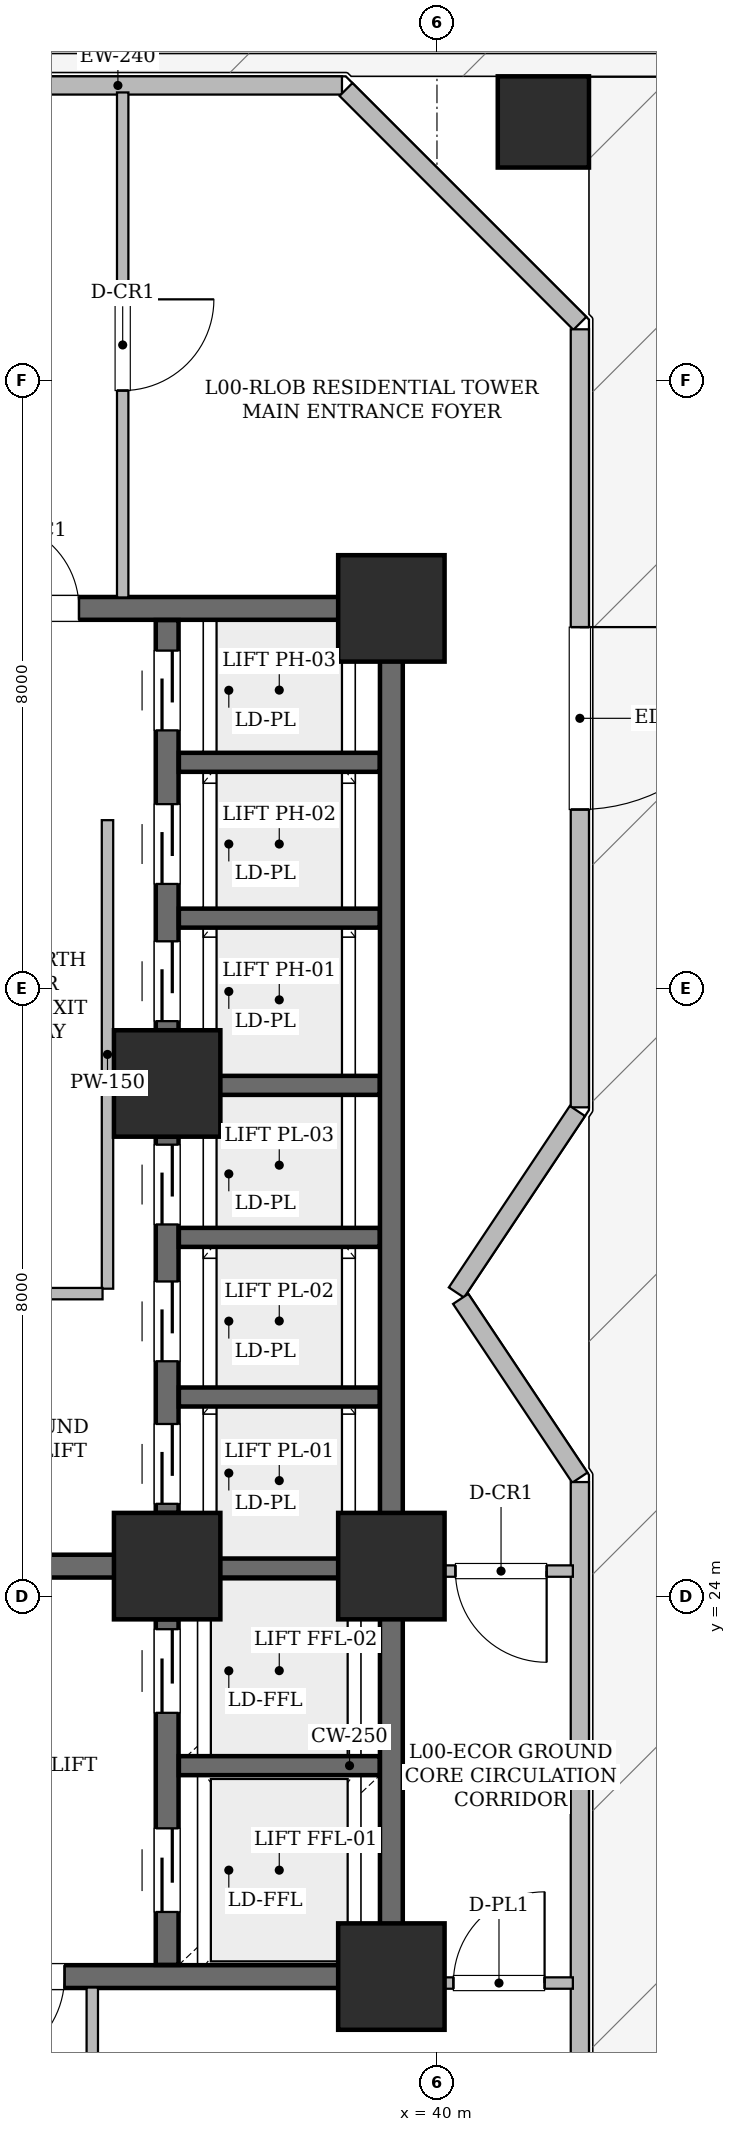
"""IFC4 building model, lengths in metres.
Left out: names, types, materials, properties, quantities, classifications, styles, units other than length and angle.
Written with IfcOpenShell. Run it as: python <this file> out.ifc"""

import sys

from ifc_helpers import new_model, si_unit, direction, frame, frame_2d, origin, origin_2d, place, context, subcontext, project, spatial, rectangle, hollow_rectangle, extrude, element, fill, save


model = new_model("IFC4")
c1 = context("Model", 3, precision=1e-05, world=origin(), true_north=direction((0.0, 1.0)))
c2 = subcontext(c1, "Body", "Model", "MODEL_VIEW")
j1 = project(units=[si_unit("LENGTHUNIT", "METRE"), si_unit("PLANEANGLEUNIT", "RADIAN")], contexts=[c1])
p1 = place(None, origin())
s1 = spatial("IfcSite", under=j1, at=p1, CompositionType="ELEMENT")
p2 = place(p1, origin())
s2 = spatial("IfcBuilding", under=s1, at=p2, CompositionType="ELEMENT")
p3 = place(p2, origin())
s3 = spatial("IfcBuildingStorey", under=s2, at=p3, CompositionType="ELEMENT", Elevation=0.0)
for number, where, z_axis, x_axis in (
    (1, (39.4, 19.0, 0.0), (0.0, 0.0, 1.0), (1.0, 0.0, 0.0)),
    (2, (36.45, 24.4, 0.0), (0.0, 0.0, 1.0), (1.0, 0.0, 0.0)),
    (3, (39.4, 24.4, 0.0), (0.0, 0.0, 1.0), (1.0, 0.0, 0.0)),
    (4, (36.45, 30.75, 0.0), (0.0, 0.0, 1.0), (1.0, 0.0, 0.0)),
    (5, (39.4, 37.0, 0.0), (0.0, 0.0, 1.0), (1.0, 0.0, 0.0)),
):
    element("IfcColumn", number, at=place(p3, frame(where, z_axis=z_axis, x_axis=x_axis)), inside=s3, PredefinedType="COLUMN", context=c2, shape_type="SweptSolid", body=[
        extrude(hollow_rectangle(XDim=1.4, YDim=1.4, WallThickness=0.07, at=origin_2d()), origin(), (0.0, 0.0, 1.0), 7.2),
    ])
p4 = place(p3, frame((41.4, 43.4, 0.0), z_axis=(0.0, 0.0, 1.0), x_axis=(1.0, 0.0, 0.0)))
e6 = element("IfcColumn", 6, at=p4, inside=s3, PredefinedType="COLUMN", context=c2, shape_type="SweptSolid", body=[
    extrude(hollow_rectangle(XDim=1.2, YDim=1.2, WallThickness=0.06, at=origin_2d()), origin(), (0.0, 0.0, 1.0), 7.2),
])
p5 = place(p3, frame((19.097, 43.88, 0.0), z_axis=(0.0, 0.0, 1.0), x_axis=(1.0, 0.0, 0.0)))
e7 = element("IfcWall", 7, at=p5, inside=s3, PredefinedType="STANDARD", context=c2, shape_type="SweptSolid", body=[
    extrude(rectangle(XDim=19.653, YDim=0.24, at=frame_2d((9.827, 0.0))), origin(), (0.0, 0.0, 1.0), 6.78),
])
p6 = place(p5, frame((11.653, 0.0, 0.0)))
e8 = element("IfcOpeningElement", 8, at=p6, cuts=e7, PredefinedType="OPENING", context=c2, shape_type="SweptSolid", body=[
    extrude(rectangle(XDim=1.8, YDim=2.2, at=frame_2d((0.9, 1.1))), frame((0.0, 0.13, 0.0), z_axis=(0.0, -1.0, 0.0), x_axis=(1.0, 0.0, 0.0)), (0.0, 0.0, 1.0), 0.26),
])
p7 = place(p5, frame((2.0, 0.0, 0.0)))
e9 = element("IfcOpeningElement", 9, at=p7, cuts=e7, PredefinedType="OPENING", context=c2, shape_type="SweptSolid", body=[
    extrude(rectangle(XDim=2.4, YDim=2.4, at=frame_2d((1.2, 1.2))), frame((0.0, 0.13, 0.0), z_axis=(0.0, -1.0, 0.0), x_axis=(1.0, 0.0, 0.0)), (0.0, 0.0, 1.0), 0.26),
])
p8 = place(p3, frame((38.803, 43.827, 0.0), z_axis=(0.0, 0.0, 1.0), x_axis=(0.707106781187, -0.707106781187, 0.0)))
e10 = element("IfcWall", 10, at=p8, inside=s3, PredefinedType="STANDARD", context=c2, shape_type="SweptSolid", body=[
    extrude(rectangle(XDim=4.351, YDim=0.24, at=frame_2d((2.176, 0.0))), origin(), (0.0, 0.0, 1.0), 6.78),
])
p9 = place(p3, frame((41.88, 40.672, 0.0), z_axis=(0.0, 0.0, 1.0), x_axis=(0.0, -1.0, 0.0)))
e11 = element("IfcWall", 11, at=p9, inside=s3, PredefinedType="STANDARD", context=c2, shape_type="SweptSolid", body=[
    extrude(rectangle(XDim=10.236, YDim=0.24, at=frame_2d((5.118, 0.0))), origin(), (0.0, 0.0, 1.0), 6.78),
])
p10 = place(p9, frame((3.918, 0.0, 0.0)))
e12 = element("IfcOpeningElement", 12, at=p10, cuts=e11, PredefinedType="OPENING", context=c2, shape_type="SweptSolid", body=[
    extrude(rectangle(XDim=2.4, YDim=2.4, at=frame_2d((1.2, 1.2))), frame((0.0, 0.13, 0.0), z_axis=(0.0, -1.0, 0.0), x_axis=(1.0, 0.0, 0.0)), (0.0, 0.0, 1.0), 0.26),
])
p11 = place(p3, frame((41.848, 30.388, 0.0), z_axis=(0.0, 0.0, 1.0), x_axis=(-0.55466093221, -0.83207646901, 0.0)))
e13 = element("IfcWall", 13, at=p11, inside=s3, PredefinedType="STANDARD", context=c2, shape_type="SweptSolid", body=[
    extrude(rectangle(XDim=2.87, YDim=0.24, at=frame_2d((1.435, 0.0))), origin(), (0.0, 0.0, 1.0), 6.78),
])
p12 = place(p3, frame((40.312, 27.916, 0.0), z_axis=(0.0, 0.0, 1.0), x_axis=(0.554660333073, -0.832076868394, 0.0)))
e14 = element("IfcWall", 14, at=p12, inside=s3, PredefinedType="STANDARD", context=c2, shape_type="SweptSolid", body=[
    extrude(rectangle(XDim=2.827, YDim=0.24, at=frame_2d((1.413, 0.0))), origin(), (0.0, 0.0, 1.0), 6.78),
])
p13 = place(p3, frame((41.88, 25.506, 0.0), z_axis=(0.0, 0.0, 1.0), x_axis=(0.0, -1.0, 0.0)))
e15 = element("IfcWall", 15, at=p13, inside=s3, PredefinedType="STANDARD", context=c2, shape_type="SweptSolid", body=[
    extrude(rectangle(XDim=10.256, YDim=0.24, at=frame_2d((5.128, 0.0))), origin(), (0.0, 0.0, 1.0), 6.78),
])
p14 = place(p3, frame((39.4, 19.0, 0.0), z_axis=(0.0, 0.0, 1.0), x_axis=(-1.0, 0.0, 0.0)))
e16 = element("IfcWall", 16, at=p14, inside=s3, PredefinedType="SHEAR", context=c2, shape_type="SweptSolid", body=[
    extrude(rectangle(XDim=10.4, YDim=0.3, at=frame_2d((5.2, 0.0))), origin(), (0.0, 0.0, 1.0), 6.78),
])
p15 = place(p14, frame((4.3, 0.0, 0.0)))
e17 = element("IfcOpeningElement", 17, at=p15, cuts=e16, PredefinedType="OPENING", context=c2, shape_type="SweptSolid", body=[
    extrude(rectangle(XDim=1.2, YDim=2.15, at=frame_2d((0.6, 1.075))), frame((0.0, 0.16, 0.0), z_axis=(0.0, -1.0, 0.0), x_axis=(1.0, 0.0, 0.0)), (0.0, 0.0, 1.0), 0.32),
])
p16 = place(p3, frame((29.0, 37.0, 0.0), z_axis=(0.0, 0.0, 1.0), x_axis=(1.0, 0.0, 0.0)))
e18 = element("IfcWall", 18, at=p16, inside=s3, PredefinedType="SHEAR", context=c2, shape_type="SweptSolid", body=[
    extrude(rectangle(XDim=10.4, YDim=0.3, at=frame_2d((5.2, 0.0))), origin(), (0.0, 0.0, 1.0), 6.78),
])
p17 = place(p16, frame((5.14, 0.0, 0.0)))
e19 = element("IfcOpeningElement", 19, at=p17, cuts=e18, PredefinedType="OPENING", context=c2, shape_type="SweptSolid", body=[
    extrude(rectangle(XDim=1.15, YDim=2.2, at=frame_2d((0.575, 1.1))), frame((0.0, 0.16, 0.0), z_axis=(0.0, -1.0, 0.0), x_axis=(1.0, 0.0, 0.0)), (0.0, 0.0, 1.0), 0.32),
])
p18 = place(p3, frame((39.4, 19.0, 0.0), z_axis=(0.0, 0.0, 1.0), x_axis=(0.0, 1.0, 0.0)))
e20 = element("IfcWall", 20, at=p18, inside=s3, PredefinedType="SHEAR", context=c2, shape_type="SweptSolid", body=[
    extrude(rectangle(XDim=5.4, YDim=0.3, at=frame_2d((2.7, 0.0))), origin(), (0.0, 0.0, 1.0), 6.78),
])
p19 = place(p3, frame((39.4, 24.4, 0.0), z_axis=(0.0, 0.0, 1.0), x_axis=(0.0, 1.0, 0.0)))
e21 = element("IfcWall", 21, at=p19, inside=s3, PredefinedType="SHEAR", context=c2, shape_type="SweptSolid", body=[
    extrude(rectangle(XDim=12.6, YDim=0.3, at=frame_2d((6.3, 0.0))), origin(), (0.0, 0.0, 1.0), 6.78),
])
p20 = place(p3, frame((32.65, 24.4, 0.0), z_axis=(0.0, 0.0, 1.0), x_axis=(1.0, 0.0, 0.0)))
e22 = element("IfcWall", 22, at=p20, inside=s3, PredefinedType="SHEAR", context=c2, shape_type="SweptSolid", body=[
    extrude(rectangle(XDim=3.8, YDim=0.3, at=frame_2d((1.9, 0.0))), origin(), (0.0, 0.0, 1.0), 6.78),
])
p21 = place(p3, frame((36.45, 19.154, 0.0), z_axis=(0.0, 0.0, 1.0), x_axis=(0.0, 1.0, 0.0)))
e23 = element("IfcWall", 23, at=p21, inside=s3, PredefinedType="SHEAR", context=c2, shape_type="SweptSolid", body=[
    extrude(rectangle(XDim=4.546, YDim=0.3, at=frame_2d((2.273, 0.0))), origin(), (0.0, 0.0, 1.0), 6.78),
])
p22 = place(p21, frame((0.696, 0.0, 0.0)))
e24 = element("IfcOpeningElement", 24, at=p22, cuts=e23, PredefinedType="OPENING", context=c2, shape_type="SweptSolid", body=[
    extrude(rectangle(XDim=1.1, YDim=2.15, at=frame_2d((0.55, 1.075))), frame((0.0, 0.16, 0.0), z_axis=(0.0, -1.0, 0.0), x_axis=(1.0, 0.0, 0.0)), (0.0, 0.0, 1.0), 0.32),
])
p23 = place(p21, frame((3.316, 0.0, 0.0)))
e25 = element("IfcOpeningElement", 25, at=p23, cuts=e23, PredefinedType="OPENING", context=c2, shape_type="SweptSolid", body=[
    extrude(rectangle(XDim=1.1, YDim=2.15, at=frame_2d((0.55, 1.075))), frame((0.0, 0.16, 0.0), z_axis=(0.0, -1.0, 0.0), x_axis=(1.0, 0.0, 0.0)), (0.0, 0.0, 1.0), 0.32),
])
p24 = place(p3, frame((36.45, 25.1, 0.0), z_axis=(0.0, 0.0, 1.0), x_axis=(0.0, 1.0, 0.0)))
e26 = element("IfcWall", 26, at=p24, inside=s3, PredefinedType="SHEAR", context=c2, shape_type="SweptSolid", body=[
    extrude(rectangle(XDim=4.95, YDim=0.3, at=frame_2d((2.475, 0.0))), origin(), (0.0, 0.0, 1.0), 6.78),
])
p25 = place(p24, frame((0.12, 0.0, 0.0)))
e27 = element("IfcOpeningElement", 27, at=p25, cuts=e26, PredefinedType="OPENING", context=c2, shape_type="SweptSolid", body=[
    extrude(rectangle(XDim=1.05, YDim=2.15, at=frame_2d((0.525, 1.075))), frame((0.0, 0.16, 0.0), z_axis=(0.0, -1.0, 0.0), x_axis=(1.0, 0.0, 0.0)), (0.0, 0.0, 1.0), 0.32),
])
p26 = place(p24, frame((1.995, 0.0, 0.0)))
e28 = element("IfcOpeningElement", 28, at=p26, cuts=e26, PredefinedType="OPENING", context=c2, shape_type="SweptSolid", body=[
    extrude(rectangle(XDim=1.05, YDim=2.15, at=frame_2d((0.525, 1.075))), frame((0.0, 0.16, 0.0), z_axis=(0.0, -1.0, 0.0), x_axis=(1.0, 0.0, 0.0)), (0.0, 0.0, 1.0), 0.32),
])
p27 = place(p24, frame((3.795, 0.0, 0.0)))
e29 = element("IfcOpeningElement", 29, at=p27, cuts=e26, PredefinedType="OPENING", context=c2, shape_type="SweptSolid", body=[
    extrude(rectangle(XDim=1.05, YDim=2.15, at=frame_2d((0.525, 1.075))), frame((0.0, 0.16, 0.0), z_axis=(0.0, -1.0, 0.0), x_axis=(1.0, 0.0, 0.0)), (0.0, 0.0, 1.0), 0.32),
])
p28 = place(p3, frame((36.45, 31.45, 0.0), z_axis=(0.0, 0.0, 1.0), x_axis=(0.0, 1.0, 0.0)))
e30 = element("IfcWall", 30, at=p28, inside=s3, PredefinedType="SHEAR", context=c2, shape_type="SweptSolid", body=[
    extrude(rectangle(XDim=5.396, YDim=0.3, at=frame_2d((2.698, 0.0))), origin(), (0.0, 0.0, 1.0), 6.78),
])
p29 = place(p28, frame((0.12, 0.0, 0.0)))
e31 = element("IfcOpeningElement", 31, at=p29, cuts=e30, PredefinedType="OPENING", context=c2, shape_type="SweptSolid", body=[
    extrude(rectangle(XDim=1.05, YDim=2.15, at=frame_2d((0.525, 1.075))), frame((0.0, 0.16, 0.0), z_axis=(0.0, -1.0, 0.0), x_axis=(1.0, 0.0, 0.0)), (0.0, 0.0, 1.0), 0.32),
])
p30 = place(p28, frame((1.925, 0.0, 0.0)))
e32 = element("IfcOpeningElement", 32, at=p30, cuts=e30, PredefinedType="OPENING", context=c2, shape_type="SweptSolid", body=[
    extrude(rectangle(XDim=1.05, YDim=2.15, at=frame_2d((0.525, 1.075))), frame((0.0, 0.16, 0.0), z_axis=(0.0, -1.0, 0.0), x_axis=(1.0, 0.0, 0.0)), (0.0, 0.0, 1.0), 0.32),
])
p31 = place(p28, frame((3.945, 0.0, 0.0)))
e33 = element("IfcOpeningElement", 33, at=p31, cuts=e30, PredefinedType="OPENING", context=c2, shape_type="SweptSolid", body=[
    extrude(rectangle(XDim=1.05, YDim=2.15, at=frame_2d((0.525, 1.075))), frame((0.0, 0.16, 0.0), z_axis=(0.0, -1.0, 0.0), x_axis=(1.0, 0.0, 0.0)), (0.0, 0.0, 1.0), 0.32),
])
for number, where, z_axis, x_axis in (
    (34, (36.604, 21.775, 0.0), (0.0, 0.0, 1.0), (1.0, 0.0, 0.0)),
    (35, (36.604, 24.375, 0.0), (0.0, 0.0, 1.0), (1.0, 0.0, 0.0)),
    (36, (36.604, 26.625, 0.0), (0.0, 0.0, 1.0), (1.0, 0.0, 0.0)),
    (37, (36.604, 28.725, 0.0), (0.0, 0.0, 1.0), (1.0, 0.0, 0.0)),
    (38, (36.604, 30.725, 0.0), (0.0, 0.0, 1.0), (1.0, 0.0, 0.0)),
    (39, (36.604, 32.925, 0.0), (0.0, 0.0, 1.0), (1.0, 0.0, 0.0)),
    (40, (36.604, 34.975, 0.0), (0.0, 0.0, 1.0), (1.0, 0.0, 0.0)),
):
    element("IfcWall", number, at=place(p3, frame(where, z_axis=z_axis, x_axis=x_axis)), inside=s3, PredefinedType="SHEAR", context=c2, shape_type="SweptSolid", body=[
        extrude(rectangle(XDim=2.642, YDim=0.25, at=frame_2d((1.321, 0.0))), origin(), (0.0, 0.0, 1.0), 6.78),
    ])
p32 = place(p3, frame((35.665, 34.214, 0.0), z_axis=(0.0, 0.0, 1.0), x_axis=(0.0, -1.0, 0.0)))
e41 = element("IfcWall", 41, at=p32, inside=s3, PredefinedType="STANDARD", context=c2, shape_type="SweptSolid", body=[
    extrude(rectangle(XDim=6.164, YDim=0.15, at=frame_2d((3.082, 0.0))), origin(), (0.0, 0.0, 1.0), 6.78),
])
p33 = place(p3, frame((35.6, 27.985, 0.0), z_axis=(0.0, 0.0, 1.0), x_axis=(-1.0, 0.0, 0.0)))
e42 = element("IfcWall", 42, at=p33, inside=s3, PredefinedType="STANDARD", context=c2, shape_type="SweptSolid", body=[
    extrude(rectangle(XDim=2.806, YDim=0.15, at=frame_2d((1.403, 0.0))), origin(), (0.0, 0.0, 1.0), 6.237),
])
p34 = place(p33, frame((0.803, 0.0, 0.0)))
e43 = element("IfcOpeningElement", 43, at=p34, cuts=e42, PredefinedType="OPENING", context=c2, shape_type="SweptSolid", body=[
    extrude(rectangle(XDim=1.2, YDim=2.15, at=frame_2d((0.6, 1.075))), frame((0.0, 0.085, 0.0), z_axis=(0.0, -1.0, 0.0), x_axis=(1.0, 0.0, 0.0)), (0.0, 0.0, 1.0), 0.17),
])
p35 = place(p3, frame((35.465, 18.856, 0.0), z_axis=(0.0, 0.0, 1.0), x_axis=(0.0, -1.0, 0.0)))
e44 = element("IfcWall", 44, at=p35, inside=s3, PredefinedType="STANDARD", context=c2, shape_type="SweptSolid", body=[
    extrude(rectangle(XDim=6.644, YDim=0.15, at=frame_2d((3.322, 0.0))), origin(), (0.0, 0.0, 1.0), 5.915),
])
p36 = place(p35, frame((2.722, 0.0, 0.0)))
e45 = element("IfcOpeningElement", 45, at=p36, cuts=e44, PredefinedType="OPENING", context=c2, shape_type="SweptSolid", body=[
    extrude(rectangle(XDim=1.2, YDim=2.15, at=frame_2d((0.6, 1.075))), frame((0.0, 0.085, 0.0), z_axis=(0.0, -1.0, 0.0), x_axis=(1.0, 0.0, 0.0)), (0.0, 0.0, 1.0), 0.17),
])
p37 = place(p3, frame((35.865, 43.788, 0.0), z_axis=(0.0, 0.0, 1.0), x_axis=(0.0, -1.0, 0.0)))
e46 = element("IfcWall", 46, at=p37, inside=s3, PredefinedType="STANDARD", context=c2, shape_type="SweptSolid", body=[
    extrude(rectangle(XDim=6.644, YDim=0.15, at=frame_2d((3.322, 0.0))), origin(), (0.0, 0.0, 1.0), 5.915),
])
p38 = place(p37, frame((2.722, 0.0, 0.0)))
e47 = element("IfcOpeningElement", 47, at=p38, cuts=e46, PredefinedType="OPENING", context=c2, shape_type="SweptSolid", body=[
    extrude(rectangle(XDim=1.2, YDim=2.15, at=frame_2d((0.6, 1.075))), frame((0.0, 0.085, 0.0), z_axis=(0.0, -1.0, 0.0), x_axis=(1.0, 0.0, 0.0)), (0.0, 0.0, 1.0), 0.17),
])
p39 = place(p3, frame((39.457, 18.915, 0.0), z_axis=(0.0, 0.0, 1.0), x_axis=(1.0, 0.0, 0.0)))
e48 = element("IfcWall", 48, at=p39, inside=s3, PredefinedType="STANDARD", context=c2, shape_type="SweptSolid", body=[
    extrude(rectangle(XDim=2.331, YDim=0.15, at=frame_2d((1.166, 0.0))), origin(), (0.0, 0.0, 1.0), 5.915),
])
p40 = place(p39, frame((0.759, 0.0, 0.0)))
e49 = element("IfcOpeningElement", 49, at=p40, cuts=e48, PredefinedType="OPENING", context=c2, shape_type="SweptSolid", body=[
    extrude(rectangle(XDim=1.2, YDim=2.15, at=frame_2d((0.6, 1.075))), frame((0.0, 0.085, 0.0), z_axis=(0.0, -1.0, 0.0), x_axis=(1.0, 0.0, 0.0)), (0.0, 0.0, 1.0), 0.17),
])
p41 = place(p3, frame((41.788, 24.335, 0.0), z_axis=(0.0, 0.0, 1.0), x_axis=(-1.0, 0.0, 0.0)))
e50 = element("IfcWall", 50, at=p41, inside=s3, PredefinedType="STANDARD", context=c2, shape_type="SweptSolid", body=[
    extrude(rectangle(XDim=2.244, YDim=0.15, at=frame_2d((1.122, 0.0))), origin(), (0.0, 0.0, 1.0), 5.915),
])
p42 = place(p41, frame((0.345, 0.0, 0.0)))
e51 = element("IfcOpeningElement", 51, at=p42, cuts=e50, PredefinedType="OPENING", context=c2, shape_type="SweptSolid", body=[
    extrude(rectangle(XDim=1.2, YDim=2.15, at=frame_2d((0.6, 1.075))), frame((0.0, 0.085, 0.0), z_axis=(0.0, -1.0, 0.0), x_axis=(1.0, 0.0, 0.0)), (0.0, 0.0, 1.0), 0.17),
])
p43 = place(p10, origin())
e52 = element("IfcDoor", 52, at=p43, inside=s3, OperationType="SINGLE_SWING_LEFT", PredefinedType="DOOR", context=c2, shape_type="SweptSolid", body=[
    extrude(rectangle(XDim=2.4, YDim=2.4, at=frame_2d((1.2, 1.2))), frame((0.0, 0.025, 0.0), z_axis=(0.0, -1.0, 0.0), x_axis=(1.0, 0.0, 0.0)), (0.0, 0.0, 1.0), 0.05),
])
fill(e12, e52)
p44 = place(p15, origin())
e53 = element("IfcDoor", 53, at=p44, inside=s3, OperationType="SINGLE_SWING_RIGHT", PredefinedType="DOOR", context=c2, shape_type="SweptSolid", body=[
    extrude(rectangle(XDim=1.2, YDim=2.15, at=frame_2d((0.6, 1.075))), frame((0.0, 0.025, 0.0), z_axis=(0.0, -1.0, 0.0), x_axis=(1.0, 0.0, 0.0)), (0.0, 0.0, 1.0), 0.05),
])
fill(e17, e53)
p45 = place(p17, origin())
e54 = element("IfcDoor", 54, at=p45, inside=s3, OperationType="SINGLE_SWING_LEFT", PredefinedType="DOOR", context=c2, shape_type="SweptSolid", body=[
    extrude(rectangle(XDim=1.15, YDim=2.2, at=frame_2d((0.575, 1.1))), frame((0.0, 0.025, 0.0), z_axis=(0.0, -1.0, 0.0), x_axis=(1.0, 0.0, 0.0)), (0.0, 0.0, 1.0), 0.05),
])
fill(e19, e54)
p46 = place(p22, origin())
e55 = element("IfcDoor", 55, at=p46, inside=s3, OperationType="SLIDING_TO_LEFT", PredefinedType="DOOR", context=c2, shape_type="SweptSolid", body=[
    extrude(rectangle(XDim=1.1, YDim=2.15, at=frame_2d((0.55, 1.075))), frame((0.0, 0.025, 0.0), z_axis=(0.0, -1.0, 0.0), x_axis=(1.0, 0.0, 0.0)), (0.0, 0.0, 1.0), 0.05),
])
fill(e24, e55)
p47 = place(p23, origin())
e56 = element("IfcDoor", 56, at=p47, inside=s3, OperationType="SLIDING_TO_LEFT", PredefinedType="DOOR", context=c2, shape_type="SweptSolid", body=[
    extrude(rectangle(XDim=1.1, YDim=2.15, at=frame_2d((0.55, 1.075))), frame((0.0, 0.025, 0.0), z_axis=(0.0, -1.0, 0.0), x_axis=(1.0, 0.0, 0.0)), (0.0, 0.0, 1.0), 0.05),
])
fill(e25, e56)
p48 = place(p25, origin())
e57 = element("IfcDoor", 57, at=p48, inside=s3, OperationType="SLIDING_TO_LEFT", PredefinedType="DOOR", context=c2, shape_type="SweptSolid", body=[
    extrude(rectangle(XDim=1.05, YDim=2.15, at=frame_2d((0.525, 1.075))), frame((0.0, 0.025, 0.0), z_axis=(0.0, -1.0, 0.0), x_axis=(1.0, 0.0, 0.0)), (0.0, 0.0, 1.0), 0.05),
])
fill(e27, e57)
p49 = place(p26, origin())
e58 = element("IfcDoor", 58, at=p49, inside=s3, OperationType="SLIDING_TO_LEFT", PredefinedType="DOOR", context=c2, shape_type="SweptSolid", body=[
    extrude(rectangle(XDim=1.05, YDim=2.15, at=frame_2d((0.525, 1.075))), frame((0.0, 0.025, 0.0), z_axis=(0.0, -1.0, 0.0), x_axis=(1.0, 0.0, 0.0)), (0.0, 0.0, 1.0), 0.05),
])
fill(e28, e58)
p50 = place(p27, origin())
e59 = element("IfcDoor", 59, at=p50, inside=s3, OperationType="SLIDING_TO_LEFT", PredefinedType="DOOR", context=c2, shape_type="SweptSolid", body=[
    extrude(rectangle(XDim=1.05, YDim=2.15, at=frame_2d((0.525, 1.075))), frame((0.0, 0.025, 0.0), z_axis=(0.0, -1.0, 0.0), x_axis=(1.0, 0.0, 0.0)), (0.0, 0.0, 1.0), 0.05),
])
fill(e29, e59)
p51 = place(p29, origin())
e60 = element("IfcDoor", 60, at=p51, inside=s3, OperationType="SLIDING_TO_LEFT", PredefinedType="DOOR", context=c2, shape_type="SweptSolid", body=[
    extrude(rectangle(XDim=1.05, YDim=2.15, at=frame_2d((0.525, 1.075))), frame((0.0, 0.025, 0.0), z_axis=(0.0, -1.0, 0.0), x_axis=(1.0, 0.0, 0.0)), (0.0, 0.0, 1.0), 0.05),
])
fill(e31, e60)
p52 = place(p30, origin())
e61 = element("IfcDoor", 61, at=p52, inside=s3, OperationType="SLIDING_TO_LEFT", PredefinedType="DOOR", context=c2, shape_type="SweptSolid", body=[
    extrude(rectangle(XDim=1.05, YDim=2.15, at=frame_2d((0.525, 1.075))), frame((0.0, 0.025, 0.0), z_axis=(0.0, -1.0, 0.0), x_axis=(1.0, 0.0, 0.0)), (0.0, 0.0, 1.0), 0.05),
])
fill(e32, e61)
p53 = place(p31, origin())
e62 = element("IfcDoor", 62, at=p53, inside=s3, OperationType="SLIDING_TO_LEFT", PredefinedType="DOOR", context=c2, shape_type="SweptSolid", body=[
    extrude(rectangle(XDim=1.05, YDim=2.15, at=frame_2d((0.525, 1.075))), frame((0.0, 0.025, 0.0), z_axis=(0.0, -1.0, 0.0), x_axis=(1.0, 0.0, 0.0)), (0.0, 0.0, 1.0), 0.05),
])
fill(e33, e62)
p54 = place(p38, origin())
e63 = element("IfcDoor", 63, at=p54, inside=s3, OperationType="SINGLE_SWING_LEFT", PredefinedType="DOOR", context=c2, shape_type="SweptSolid", body=[
    extrude(rectangle(XDim=1.2, YDim=2.15, at=frame_2d((0.6, 1.075))), frame((0.0, 0.025, 0.0), z_axis=(0.0, -1.0, 0.0), x_axis=(1.0, 0.0, 0.0)), (0.0, 0.0, 1.0), 0.05),
])
fill(e47, e63)
p55 = place(p40, origin())
e64 = element("IfcDoor", 64, at=p55, inside=s3, OperationType="SINGLE_SWING_RIGHT", PredefinedType="DOOR", context=c2, shape_type="SweptSolid", body=[
    extrude(rectangle(XDim=1.2, YDim=2.15, at=frame_2d((0.6, 1.075))), frame((0.0, 0.025, 0.0), z_axis=(0.0, -1.0, 0.0), x_axis=(1.0, 0.0, 0.0)), (0.0, 0.0, 1.0), 0.05),
])
fill(e49, e64)
p56 = place(p42, origin())
e65 = element("IfcDoor", 65, at=p56, inside=s3, OperationType="SINGLE_SWING_LEFT", PredefinedType="DOOR", context=c2, shape_type="SweptSolid", body=[
    extrude(rectangle(XDim=1.2, YDim=2.15, at=frame_2d((0.6, 1.075))), frame((0.0, 0.025, 0.0), z_axis=(0.0, -1.0, 0.0), x_axis=(1.0, 0.0, 0.0)), (0.0, 0.0, 1.0), 0.05),
])
fill(e51, e65)
save(model, sys.argv[1])
